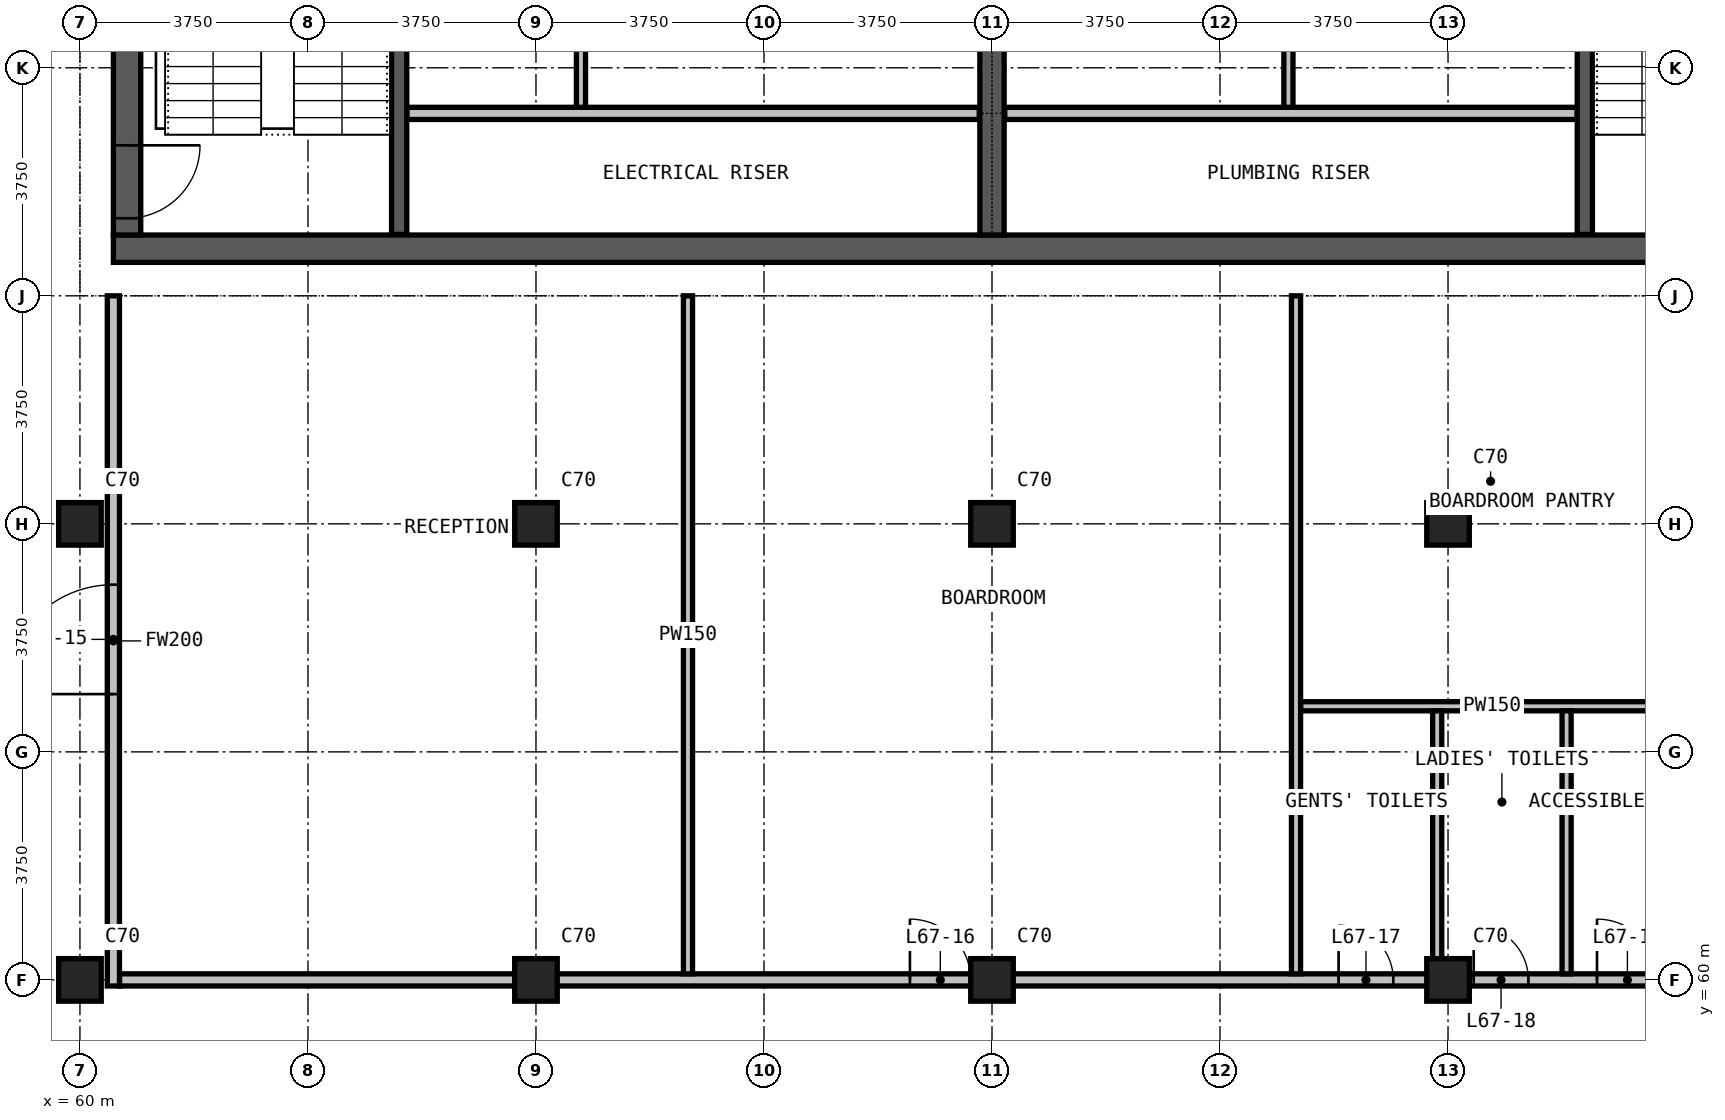
"""IFC4 building model, lengths in metres.
Left out: names, types, materials, properties, quantities, classifications, styles, units other than length and angle.
Written with IfcOpenShell. Run it as: python <this file> out.ifc"""

import sys

from ifc_helpers import new_model, si_unit, direction, frame, frame_2d, origin, origin_2d, place, context, subcontext, project, spatial, rectangle, extrude, element, fill, save


model = new_model("IFC4")
c1 = context("Model", 3, precision=1e-05, world=origin(), true_north=direction((0.0, 1.0)))
c2 = subcontext(c1, "Body", "Model", "MODEL_VIEW")
j1 = project(units=[si_unit("LENGTHUNIT", "METRE"), si_unit("PLANEANGLEUNIT", "RADIAN")], contexts=[c1])
p1 = place(None, origin())
s1 = spatial("IfcSite", under=j1, at=p1, CompositionType="ELEMENT")
p2 = place(p1, origin())
s2 = spatial("IfcBuilding", under=s1, at=p2, CompositionType="ELEMENT")
p3 = place(p2, frame((0.0, 0.0, 258.5)))
s3 = spatial("IfcBuildingStorey", under=s2, at=p3, CompositionType="ELEMENT", Elevation=258.5)
for number, where, z_axis, x_axis in (
    (1, (60.0, 60.0, 0.0), (0.0, 0.0, 1.0), (1.0, 0.0, 0.0)),
    (2, (60.0, 67.5, 0.0), (0.0, 0.0, 1.0), (1.0, 0.0, 0.0)),
    (3, (67.5, 60.0, 0.0), (0.0, 0.0, 1.0), (1.0, 0.0, 0.0)),
    (4, (67.5, 67.5, 0.0), (0.0, 0.0, 1.0), (1.0, 0.0, 0.0)),
    (5, (75.0, 60.0, 0.0), (0.0, 0.0, 1.0), (1.0, 0.0, 0.0)),
    (6, (75.0, 67.5, 0.0), (0.0, 0.0, 1.0), (1.0, 0.0, 0.0)),
    (7, (82.5, 60.0, 0.0), (0.0, 0.0, 1.0), (1.0, 0.0, 0.0)),
    (8, (82.5, 67.5, 0.0), (0.0, 0.0, 1.0), (1.0, 0.0, 0.0)),
):
    element("IfcColumn", number, at=place(p3, frame(where, z_axis=z_axis, x_axis=x_axis)), inside=s3, PredefinedType="COLUMN", context=c2, shape_type="SweptSolid", body=[
        extrude(rectangle(XDim=0.7, YDim=0.7, at=origin_2d()), origin(), (0.0, 0.0, 1.0), 3.6),
    ])
p4 = place(p3, frame((60.55, 72.025, 0.0), z_axis=(0.0, 0.0, 1.0), x_axis=(1.0, 0.0, 0.0)))
e9 = element("IfcWall", 9, at=p4, inside=s3, PredefinedType="SHEAR", context=c2, shape_type="SweptSolid", body=[
    extrude(rectangle(XDim=28.9, YDim=0.45, at=frame_2d((14.45, 0.0))), origin(), (0.0, 0.0, 1.0), 3.6),
])
p5 = place(p3, frame((60.775, 92.75, 0.0), z_axis=(0.0, 0.0, 1.0), x_axis=(0.0, -1.0, 0.0)))
e10 = element("IfcWall", 10, at=p5, inside=s3, PredefinedType="SHEAR", context=c2, shape_type="SweptSolid", body=[
    extrude(rectangle(XDim=20.5, YDim=0.45, at=frame_2d((10.25, 0.0))), origin(), (0.0, 0.0, 1.0), 3.6),
])
p6 = place(p5, frame((19.025, 0.0, 0.0)))
e11 = element("IfcOpeningElement", 11, at=p6, cuts=e10, PredefinedType="OPENING", context=c2, shape_type="SweptSolid", body=[
    extrude(rectangle(XDim=1.2, YDim=2.2, at=frame_2d((0.6, 1.1))), frame((0.0, 0.235, 0.0), z_axis=(0.0, -1.0, 0.0), x_axis=(1.0, 0.0, 0.0)), (0.0, 0.0, 1.0), 0.47),
])
p7 = place(p5, frame((8.025, 0.0, 0.0)))
e12 = element("IfcOpeningElement", 12, at=p7, cuts=e10, PredefinedType="OPENING", context=c2, shape_type="SweptSolid", body=[
    extrude(rectangle(XDim=1.2, YDim=2.2, at=frame_2d((0.6, 1.1))), frame((0.0, 0.235, 0.0), z_axis=(0.0, -1.0, 0.0), x_axis=(1.0, 0.0, 0.0)), (0.0, 0.0, 1.0), 0.47),
])
p8 = place(p3, frame((75.0, 72.25, 0.0), z_axis=(0.0, 0.0, 1.0), x_axis=(0.0, 1.0, 0.0)))
e13 = element("IfcWall", 13, at=p8, inside=s3, PredefinedType="SHEAR", context=c2, shape_type="SweptSolid", body=[
    extrude(rectangle(XDim=6.35, YDim=0.4, at=frame_2d((3.175, 0.0))), origin(), (0.0, 0.0, 1.0), 3.6),
])
for number, where, z_axis, x_axis in (
    (14, (65.375, 74.25, 0.0), (0.0, 0.0, 1.0), (1.0, 0.0, 0.0)),
    (15, (75.21, 74.25, 0.0), (0.0, 0.0, 1.0), (1.0, 0.0, 0.0)),
):
    element("IfcWall", number, at=place(p3, frame(where, z_axis=z_axis, x_axis=x_axis)), inside=s3, PredefinedType="PARTITIONING", context=c2, shape_type="SweptSolid", body=[
        extrude(rectangle(XDim=9.415, YDim=0.2, at=frame_2d((4.708, 0.0))), origin(), (0.0, 0.0, 1.0), 3.3),
    ])
p9 = place(p3, frame((60.65, 60.0, 0.0), z_axis=(0.0, 0.0, 1.0), x_axis=(1.0, 0.0, 0.0)))
e16 = element("IfcWall", 16, at=p9, inside=s3, PredefinedType="PARTITIONING", context=c2, shape_type="SweptSolid", body=[
    extrude(rectangle(XDim=28.7, YDim=0.2, at=frame_2d((14.35, 0.0))), origin(), (0.0, 0.0, 1.0), 3.3),
])
p10 = place(p9, frame((13.0, 0.0, 0.0)))
e17 = element("IfcOpeningElement", 17, at=p10, cuts=e16, PredefinedType="OPENING", context=c2, shape_type="SweptSolid", body=[
    extrude(rectangle(XDim=1.0, YDim=2.2, at=frame_2d((0.5, 1.1))), frame((0.0, 0.11, 0.0), z_axis=(0.0, -1.0, 0.0), x_axis=(1.0, 0.0, 0.0)), (0.0, 0.0, 1.0), 0.22),
])
p11 = place(p9, frame((20.05, 0.0, 0.0)))
e18 = element("IfcOpeningElement", 18, at=p11, cuts=e16, PredefinedType="OPENING", context=c2, shape_type="SweptSolid", body=[
    extrude(rectangle(XDim=0.9, YDim=2.2, at=frame_2d((0.45, 1.1))), frame((0.0, 0.11, 0.0), z_axis=(0.0, -1.0, 0.0), x_axis=(1.0, 0.0, 0.0)), (0.0, 0.0, 1.0), 0.22),
])
p12 = place(p9, frame((22.272, 0.0, 0.0)))
e19 = element("IfcOpeningElement", 19, at=p12, cuts=e16, PredefinedType="OPENING", context=c2, shape_type="SweptSolid", body=[
    extrude(rectangle(XDim=0.9, YDim=2.2, at=frame_2d((0.45, 1.1))), frame((0.0, 0.11, 0.0), z_axis=(0.0, -1.0, 0.0), x_axis=(1.0, 0.0, 0.0)), (0.0, 0.0, 1.0), 0.22),
])
p13 = place(p9, frame((24.3, 0.0, 0.0)))
e20 = element("IfcOpeningElement", 20, at=p13, cuts=e16, PredefinedType="OPENING", context=c2, shape_type="SweptSolid", body=[
    extrude(rectangle(XDim=1.0, YDim=2.2, at=frame_2d((0.5, 1.1))), frame((0.0, 0.11, 0.0), z_axis=(0.0, -1.0, 0.0), x_axis=(1.0, 0.0, 0.0)), (0.0, 0.0, 1.0), 0.22),
])
p14 = place(p3, frame((60.55, 59.9, 0.0), z_axis=(0.0, 0.0, 1.0), x_axis=(0.0, 1.0, 0.0)))
e21 = element("IfcWall", 21, at=p14, inside=s3, PredefinedType="PARTITIONING", context=c2, shape_type="SweptSolid", body=[
    extrude(rectangle(XDim=11.35, YDim=0.2, at=frame_2d((5.675, 0.0))), origin(), (0.0, 0.0, 1.0), 3.3),
])
p15 = place(p14, frame((4.8, 0.0, 0.0)))
e22 = element("IfcOpeningElement", 22, at=p15, cuts=e21, PredefinedType="OPENING", context=c2, shape_type="SweptSolid", body=[
    extrude(rectangle(XDim=1.8, YDim=2.2, at=frame_2d((0.9, 1.1))), frame((0.0, 0.11, 0.0), z_axis=(0.0, -1.0, 0.0), x_axis=(1.0, 0.0, 0.0)), (0.0, 0.0, 1.0), 0.22),
])
p16 = place(p3, frame((80.075, 64.5, 0.0), z_axis=(0.0, 0.0, 1.0), x_axis=(1.0, 0.0, 0.0)))
e23 = element("IfcWall", 23, at=p16, inside=s3, PredefinedType="PARTITIONING", context=c2, shape_type="SweptSolid", body=[
    extrude(rectangle(XDim=6.3, YDim=0.15, at=frame_2d((3.15, 0.0))), origin(), (0.0, 0.0, 1.0), 3.3),
])
p17 = place(p3, frame((68.24, 74.35, 0.0), z_axis=(0.0, 0.0, 1.0), x_axis=(0.0, 1.0, 0.0)))
e24 = element("IfcWall", 24, at=p17, inside=s3, PredefinedType="PARTITIONING", context=c2, shape_type="SweptSolid", body=[
    extrude(rectangle(XDim=3.8, YDim=0.15, at=frame_2d((1.9, 0.0))), origin(), (0.0, 0.0, 1.0), 3.3),
])
p18 = place(p3, frame((70.0, 60.1, 0.0), z_axis=(0.0, 0.0, 1.0), x_axis=(0.0, 1.0, 0.0)))
e25 = element("IfcWall", 25, at=p18, inside=s3, PredefinedType="PARTITIONING", context=c2, shape_type="SweptSolid", body=[
    extrude(rectangle(XDim=11.15, YDim=0.15, at=frame_2d((5.575, 0.0))), origin(), (0.0, 0.0, 1.0), 3.3),
])
p19 = place(p3, frame((79.875, 74.35, 0.0), z_axis=(0.0, 0.0, 1.0), x_axis=(0.0, 1.0, 0.0)))
e26 = element("IfcWall", 26, at=p19, inside=s3, PredefinedType="PARTITIONING", context=c2, shape_type="SweptSolid", body=[
    extrude(rectangle(XDim=3.8, YDim=0.15, at=frame_2d((1.9, 0.0))), origin(), (0.0, 0.0, 1.0), 3.3),
])
p20 = place(p3, frame((80.0, 60.1, 0.0), z_axis=(0.0, 0.0, 1.0), x_axis=(0.0, 1.0, 0.0)))
e27 = element("IfcWall", 27, at=p20, inside=s3, PredefinedType="PARTITIONING", context=c2, shape_type="SweptSolid", body=[
    extrude(rectangle(XDim=11.15, YDim=0.15, at=frame_2d((5.575, 0.0))), origin(), (0.0, 0.0, 1.0), 3.3),
])
for number, where, z_axis, x_axis in (
    (28, (82.322, 60.1, 0.0), (0.0, 0.0, 1.0), (0.0, 1.0, 0.0)),
    (29, (84.45, 60.1, 0.0), (0.0, 0.0, 1.0), (0.0, 1.0, 0.0)),
):
    element("IfcWall", number, at=place(p3, frame(where, z_axis=z_axis, x_axis=x_axis)), inside=s3, PredefinedType="PARTITIONING", context=c2, shape_type="SweptSolid", body=[
        extrude(rectangle(XDim=4.325, YDim=0.15, at=frame_2d((2.163, 0.0))), origin(), (0.0, 0.0, 1.0), 3.3),
    ])
for number, where, z_axis, x_axis in (
    (30, (65.25, 72.26, 0.0), (0.0, 0.0, 1.0), (0.0, 1.0, 0.0)),
    (31, (84.75, 72.26, 0.0), (0.0, 0.0, 1.0), (0.0, 1.0, 0.0)),
):
    element("IfcWall", number, at=place(p3, frame(where, z_axis=z_axis, x_axis=x_axis)), inside=s3, PredefinedType="PARTITIONING", context=c2, shape_type="SweptSolid", body=[
        extrude(rectangle(XDim=7.115, YDim=0.25, at=frame_2d((3.558, 0.0))), origin(), (0.0, 0.0, 1.0), 3.3),
    ])
p21 = place(p6, origin())
e32 = element("IfcDoor", 32, at=p21, inside=s3, OperationType="SINGLE_SWING_LEFT", PredefinedType="DOOR", context=c2, shape_type="SweptSolid", body=[
    extrude(rectangle(XDim=1.2, YDim=2.2, at=frame_2d((0.6, 1.1))), frame((0.0, 0.025, 0.0), z_axis=(0.0, -1.0, 0.0), x_axis=(1.0, 0.0, 0.0)), (0.0, 0.0, 1.0), 0.05),
])
fill(e11, e32)
p22 = place(p15, origin())
e33 = element("IfcDoor", 33, at=p22, inside=s3, OperationType="DOUBLE_DOOR_SINGLE_SWING", PredefinedType="DOOR", context=c2, shape_type="SweptSolid", body=[
    extrude(rectangle(XDim=1.8, YDim=2.2, at=frame_2d((0.9, 1.1))), frame((0.0, 0.025, 0.0), z_axis=(0.0, -1.0, 0.0), x_axis=(1.0, 0.0, 0.0)), (0.0, 0.0, 1.0), 0.05),
])
fill(e22, e33)
p23 = place(p10, origin())
e34 = element("IfcDoor", 34, at=p23, inside=s3, OperationType="SINGLE_SWING_LEFT", PredefinedType="DOOR", context=c2, shape_type="SweptSolid", body=[
    extrude(rectangle(XDim=1.0, YDim=2.2, at=frame_2d((0.5, 1.1))), frame((0.0, 0.025, 0.0), z_axis=(0.0, -1.0, 0.0), x_axis=(1.0, 0.0, 0.0)), (0.0, 0.0, 1.0), 0.05),
])
fill(e17, e34)
p24 = place(p11, origin())
e35 = element("IfcDoor", 35, at=p24, inside=s3, OperationType="SINGLE_SWING_RIGHT", PredefinedType="DOOR", context=c2, shape_type="SweptSolid", body=[
    extrude(rectangle(XDim=0.9, YDim=2.2, at=frame_2d((0.45, 1.1))), frame((0.0, 0.025, 0.0), z_axis=(0.0, -1.0, 0.0), x_axis=(1.0, 0.0, 0.0)), (0.0, 0.0, 1.0), 0.05),
])
fill(e18, e35)
p25 = place(p12, origin())
e36 = element("IfcDoor", 36, at=p25, inside=s3, OperationType="SINGLE_SWING_LEFT", PredefinedType="DOOR", context=c2, shape_type="SweptSolid", body=[
    extrude(rectangle(XDim=0.9, YDim=2.2, at=frame_2d((0.45, 1.1))), frame((0.0, 0.025, 0.0), z_axis=(0.0, -1.0, 0.0), x_axis=(1.0, 0.0, 0.0)), (0.0, 0.0, 1.0), 0.05),
])
fill(e19, e36)
p26 = place(p13, origin())
e37 = element("IfcDoor", 37, at=p26, inside=s3, OperationType="SINGLE_SWING_LEFT", PredefinedType="DOOR", context=c2, shape_type="SweptSolid", body=[
    extrude(rectangle(XDim=1.0, YDim=2.2, at=frame_2d((0.5, 1.1))), frame((0.0, 0.025, 0.0), z_axis=(0.0, -1.0, 0.0), x_axis=(1.0, 0.0, 0.0)), (0.0, 0.0, 1.0), 0.05),
])
fill(e20, e37)
save(model, sys.argv[1])
